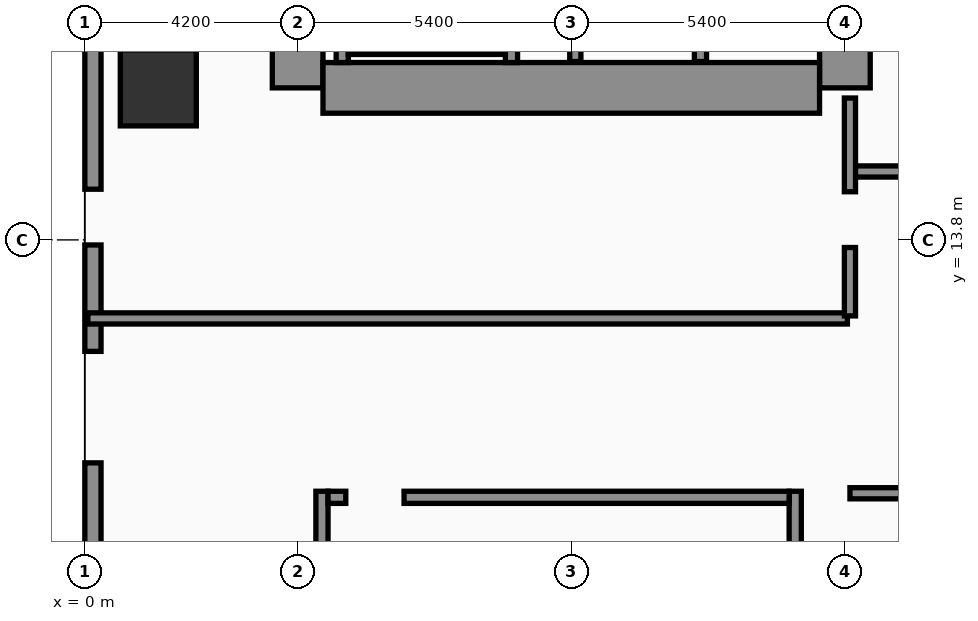
"""IFC4 building model, lengths in metres.
Left out: names, types, materials, properties, quantities, classifications, styles, units other than length and angle.
Written with IfcOpenShell. Run it as: python <this file> out.ifc"""

import sys

from ifc_helpers import new_model, si_unit, direction, frame, frame_2d, origin, origin_2d, place, context, subcontext, project, spatial, rectangle, extrude, element, fill, save


model = new_model("IFC4")
c1 = context("Model", 3, precision=1e-05, world=origin(), true_north=direction((0.0, 1.0)))
c2 = subcontext(c1, "Body", "Model", "MODEL_VIEW")
j1 = project(units=[si_unit("LENGTHUNIT", "METRE"), si_unit("PLANEANGLEUNIT", "RADIAN")], contexts=[c1])
p1 = place(None, origin())
s1 = spatial("IfcSite", under=j1, at=p1, CompositionType="ELEMENT")
p2 = place(p1, origin())
s2 = spatial("IfcBuilding", under=s1, at=p2, CompositionType="ELEMENT")
p3 = place(p2, origin())
s3 = spatial("IfcBuildingStorey", under=s2, at=p3, CompositionType="ELEMENT", Elevation=0.0)
p4 = place(p3, frame((4.2, 16.8, 0.0), z_axis=(0.0, 0.0, 1.0), x_axis=(0.0, 1.0, 0.0)))
e1 = element("IfcWall", 1, at=p4, inside=s3, PredefinedType="SHEAR", context=c2, shape_type="SweptSolid", body=[
    extrude(rectangle(XDim=21.6, YDim=1.0, at=frame_2d((10.8, 0.0))), origin(), (0.0, 0.0, 1.0), 5.68),
])
p5 = place(p3, frame((15.0, 16.8, 0.0), z_axis=(0.0, 0.0, 1.0), x_axis=(0.0, 1.0, 0.0)))
e2 = element("IfcWall", 2, at=p5, inside=s3, PredefinedType="SHEAR", context=c2, shape_type="SweptSolid", body=[
    extrude(rectangle(XDim=21.6, YDim=1.0, at=frame_2d((10.8, 0.0))), origin(), (0.0, 0.0, 1.0), 5.68),
])
p6 = place(p5, frame((8.65, 0.0, 0.0)))
e3 = element("IfcOpeningElement", 3, at=p6, cuts=e2, PredefinedType="OPENING", context=c2, shape_type="SweptSolid", body=[
    extrude(rectangle(XDim=1.1, YDim=2.2, at=frame_2d((0.55, 1.1))), frame((0.0, 0.51, 0.0), z_axis=(0.0, -1.0, 0.0), x_axis=(1.0, 0.0, 0.0)), (0.0, 0.0, 1.0), 1.02),
])
p7 = place(p5, frame((1.25, 0.0, 0.0)))
e4 = element("IfcOpeningElement", 4, at=p7, cuts=e2, PredefinedType="OPENING", context=c2, shape_type="SweptSolid", body=[
    extrude(rectangle(XDim=1.1, YDim=2.2, at=frame_2d((0.55, 1.1))), frame((0.0, 0.51, 0.0), z_axis=(0.0, -1.0, 0.0), x_axis=(1.0, 0.0, 0.0)), (0.0, 0.0, 1.0), 1.02),
])
p8 = place(p5, frame((3.8, 0.0, 0.0)))
e5 = element("IfcOpeningElement", 5, at=p8, cuts=e2, PredefinedType="OPENING", context=c2, shape_type="SweptSolid", body=[
    extrude(rectangle(XDim=1.1, YDim=2.2, at=frame_2d((0.55, 1.1))), frame((0.0, 0.51, 0.0), z_axis=(0.0, -1.0, 0.0), x_axis=(1.0, 0.0, 0.0)), (0.0, 0.0, 1.0), 1.02),
])
p9 = place(p5, frame((6.35, 0.0, 0.0)))
e6 = element("IfcOpeningElement", 6, at=p9, cuts=e2, PredefinedType="OPENING", context=c2, shape_type="SweptSolid", body=[
    extrude(rectangle(XDim=1.1, YDim=2.2, at=frame_2d((0.55, 1.1))), frame((0.0, 0.51, 0.0), z_axis=(0.0, -1.0, 0.0), x_axis=(1.0, 0.0, 0.0)), (0.0, 0.0, 1.0), 1.02),
])
p10 = place(p5, frame((10.85, 0.0, 0.0)))
e7 = element("IfcOpeningElement", 7, at=p10, cuts=e2, PredefinedType="OPENING", context=c2, shape_type="SweptSolid", body=[
    extrude(rectangle(XDim=1.1, YDim=2.2, at=frame_2d((0.55, 1.1))), frame((0.0, 0.51, 0.0), z_axis=(0.0, -1.0, 0.0), x_axis=(1.0, 0.0, 0.0)), (0.0, 0.0, 1.0), 1.02),
])
p11 = place(p5, frame((13.5, 0.0, 0.0)))
e8 = element("IfcOpeningElement", 8, at=p11, cuts=e2, PredefinedType="OPENING", context=c2, shape_type="SweptSolid", body=[
    extrude(rectangle(XDim=1.1, YDim=2.2, at=frame_2d((0.55, 1.1))), frame((0.0, 0.51, 0.0), z_axis=(0.0, -1.0, 0.0), x_axis=(1.0, 0.0, 0.0)), (0.0, 0.0, 1.0), 1.02),
])
p12 = place(p5, frame((16.15, 0.0, 0.0)))
e9 = element("IfcOpeningElement", 9, at=p12, cuts=e2, PredefinedType="OPENING", context=c2, shape_type="SweptSolid", body=[
    extrude(rectangle(XDim=1.1, YDim=2.2, at=frame_2d((0.55, 1.1))), frame((0.0, 0.51, 0.0), z_axis=(0.0, -1.0, 0.0), x_axis=(1.0, 0.0, 0.0)), (0.0, 0.0, 1.0), 1.02),
])
p13 = place(p5, frame((18.9, 0.0, 0.0)))
e10 = element("IfcOpeningElement", 10, at=p13, cuts=e2, PredefinedType="OPENING", context=c2, shape_type="SweptSolid", body=[
    extrude(rectangle(XDim=1.1, YDim=2.2, at=frame_2d((0.55, 1.1))), frame((0.0, 0.51, 0.0), z_axis=(0.0, -1.0, 0.0), x_axis=(1.0, 0.0, 0.0)), (0.0, 0.0, 1.0), 1.02),
])
p14 = place(p3, frame((4.7, 16.8, 0.0), z_axis=(0.0, 0.0, 1.0), x_axis=(1.0, 0.0, 0.0)))
e11 = element("IfcWall", 11, at=p14, inside=s3, PredefinedType="SHEAR", context=c2, shape_type="SweptSolid", body=[
    extrude(rectangle(XDim=9.8, YDim=1.0, at=frame_2d((4.9, 0.0))), origin(), (0.0, 0.0, 1.0), 5.68),
])
p15 = place(p3, frame((5.08, 17.3, 0.0), z_axis=(0.0, 0.0, 1.0), x_axis=(0.0, 1.0, 0.0)))
e12 = element("IfcWall", 12, at=p15, inside=s3, PredefinedType="SOLIDWALL", context=c2, shape_type="SweptSolid", body=[
    extrude(rectangle(XDim=9.49, YDim=0.24, at=frame_2d((4.745, 0.0))), origin(), (0.0, 0.0, 1.0), 5.68),
])
p16 = place(p3, frame((8.42, 17.3, 0.0), z_axis=(0.0, 0.0, 1.0), x_axis=(0.0, 1.0, 0.0)))
e13 = element("IfcWall", 13, at=p16, inside=s3, PredefinedType="SOLIDWALL", context=c2, shape_type="SweptSolid", body=[
    extrude(rectangle(XDim=9.49, YDim=0.24, at=frame_2d((4.745, 0.0))), origin(), (0.0, 0.0, 1.0), 5.68),
])
p17 = place(p16, frame((0.35, 0.0, 0.0)))
e14 = element("IfcOpeningElement", 14, at=p17, cuts=e13, PredefinedType="OPENING", context=c2, shape_type="SweptSolid", body=[
    extrude(rectangle(XDim=1.15, YDim=2.2, at=frame_2d((0.575, 1.1))), frame((0.0, 0.13, 0.0), z_axis=(0.0, -1.0, 0.0), x_axis=(1.0, 0.0, 0.0)), (0.0, 0.0, 1.0), 0.26),
])
p18 = place(p3, frame((5.2, 17.58, 0.0), z_axis=(0.0, 0.0, 1.0), x_axis=(1.0, 0.0, 0.0)))
e15 = element("IfcWall", 15, at=p18, inside=s3, PredefinedType="SOLIDWALL", context=c2, shape_type="SweptSolid", body=[
    extrude(rectangle(XDim=3.1, YDim=0.24, at=frame_2d((1.55, 0.0))), origin(), (0.0, 0.0, 1.0), 5.68),
])
for number, where, z_axis, x_axis in (
    (16, (4.68, 4.96, 0.0), (0.0, 0.0, 1.0), (0.0, 1.0, 0.0)),
    (17, (14.02, 4.96, 0.0), (0.0, 0.0, 1.0), (0.0, 1.0, 0.0)),
):
    element("IfcWall", number, at=place(p3, frame(where, z_axis=z_axis, x_axis=x_axis)), inside=s3, PredefinedType="SOLIDWALL", context=c2, shape_type="SweptSolid", body=[
        extrude(rectangle(XDim=3.88, YDim=0.24, at=frame_2d((1.94, 0.0))), origin(), (0.0, 0.0, 1.0), 5.68),
    ])
p19 = place(p3, frame((4.8, 8.72, 0.0), z_axis=(0.0, 0.0, 1.0), x_axis=(1.0, 0.0, 0.0)))
e18 = element("IfcWall", 18, at=p19, inside=s3, PredefinedType="SOLIDWALL", context=c2, shape_type="SweptSolid", body=[
    extrude(rectangle(XDim=9.1, YDim=0.24, at=frame_2d((4.55, 0.0))), origin(), (0.0, 0.0, 1.0), 5.68),
])
p20 = place(p19, frame((0.35, 0.0, 0.0)))
e19 = element("IfcOpeningElement", 19, at=p20, cuts=e18, PredefinedType="OPENING", context=c2, shape_type="SweptSolid", body=[
    extrude(rectangle(XDim=1.15, YDim=2.2, at=frame_2d((0.575, 1.1))), frame((0.0, 0.13, 0.0), z_axis=(0.0, -1.0, 0.0), x_axis=(1.0, 0.0, 0.0)), (0.0, 0.0, 1.0), 0.26),
])
p21 = place(p3, frame((1.45, 16.8, 0.0), z_axis=(0.0, 0.0, 1.0), x_axis=(1.0, 0.0, 0.0)))
e20 = element("IfcColumn", 20, at=p21, inside=s3, PredefinedType="COLUMN", context=c2, shape_type="SweptSolid", body=[
    extrude(rectangle(XDim=1.5, YDim=1.5, at=origin_2d()), origin(), (0.0, 0.0, 1.0), 5.68),
])
p22 = place(p3, frame((0.16, 2.3, 0.0), z_axis=(0.0, 0.0, 1.0), x_axis=(0.0, 1.0, 0.0)))
e21 = element("IfcWall", 21, at=p22, inside=s3, PredefinedType="SOLIDWALL", context=c2, shape_type="SweptSolid", body=[
    extrude(rectangle(XDim=53.4, YDim=0.32, at=frame_2d((26.7, 0.0))), origin(), (0.0, 0.0, 1.0), 5.68),
])
p23 = place(p22, frame((7.1, 0.0, 0.0)))
e22 = element("IfcOpeningElement", 22, at=p23, cuts=e21, PredefinedType="OPENING", context=c2, shape_type="SweptSolid", body=[
    extrude(rectangle(XDim=2.2, YDim=2.5, at=frame_2d((1.1, 1.25))), frame((0.0, 0.17, 0.0), z_axis=(0.0, -1.0, 0.0), x_axis=(1.0, 0.0, 0.0)), (0.0, 0.0, 1.0), 0.34),
])
p24 = place(p22, frame((11.4, 0.0, 0.0)))
e23 = element("IfcOpeningElement", 23, at=p24, cuts=e21, PredefinedType="OPENING", context=c2, shape_type="SweptSolid", body=[
    extrude(rectangle(XDim=1.1, YDim=2.2, at=frame_2d((0.55, 1.1))), frame((0.0, 0.17, 0.0), z_axis=(0.0, -1.0, 0.0), x_axis=(1.0, 0.0, 0.0)), (0.0, 0.0, 1.0), 0.34),
])
p25 = place(p3, frame((9.68, 17.32, 0.0), z_axis=(0.0, 0.0, 1.0), x_axis=(0.0, 1.0, 0.0)))
e24 = element("IfcWall", 24, at=p25, inside=s3, PredefinedType="SOLIDWALL", context=c2, shape_type="SweptSolid", body=[
    extrude(rectangle(XDim=12.44, YDim=0.22, at=frame_2d((6.22, 0.0))), origin(), (0.0, 0.0, 1.0), 5.68),
])
p26 = place(p25, frame((8.23, 0.0, 0.0)))
e25 = element("IfcOpeningElement", 25, at=p26, cuts=e24, PredefinedType="OPENING", context=c2, shape_type="SweptSolid", body=[
    extrude(rectangle(XDim=1.1, YDim=2.2, at=frame_2d((0.55, 1.1))), frame((0.0, 0.12, 0.0), z_axis=(0.0, -1.0, 0.0), x_axis=(1.0, 0.0, 0.0)), (0.0, 0.0, 1.0), 0.24),
])
p27 = place(p3, frame((12.15, 17.32, 0.0), z_axis=(0.0, 0.0, 1.0), x_axis=(0.0, 1.0, 0.0)))
e26 = element("IfcWall", 26, at=p27, inside=s3, PredefinedType="SOLIDWALL", context=c2, shape_type="SweptSolid", body=[
    extrude(rectangle(XDim=7.65, YDim=0.24, at=frame_2d((3.825, 0.0))), origin(), (0.0, 0.0, 1.0), 5.68),
])
p28 = place(p3, frame((0.06, 12.25, 0.0), z_axis=(0.0, 0.0, 1.0), x_axis=(1.0, 0.0, 0.0)))
e27 = element("IfcWall", 27, at=p28, inside=s3, PredefinedType="SOLIDWALL", context=c2, shape_type="SweptSolid", body=[
    extrude(rectangle(XDim=14.99, YDim=0.22, at=frame_2d((7.495, 0.0))), origin(), (0.0, 0.0, 1.0), 4.88),
])
p29 = place(p3, frame((15.1, 15.15, 0.0), z_axis=(0.0, 0.0, 1.0), x_axis=(1.0, 0.0, 0.0)))
e28 = element("IfcWall", 28, at=p29, inside=s3, PredefinedType="SOLIDWALL", context=c2, shape_type="SweptSolid", body=[
    extrude(rectangle(XDim=6.4, YDim=0.22, at=frame_2d((3.2, 0.0))), origin(), (0.0, 0.0, 1.0), 4.48),
])
p30 = place(p29, frame((1.8, 0.0, 0.0)))
e29 = element("IfcOpeningElement", 29, at=p30, cuts=e28, PredefinedType="OPENING", context=c2, shape_type="SweptSolid", body=[
    extrude(rectangle(XDim=2.2, YDim=2.5, at=frame_2d((1.1, 1.25))), frame((0.0, 0.12, 0.0), z_axis=(0.0, -1.0, 0.0), x_axis=(1.0, 0.0, 0.0)), (0.0, 0.0, 1.0), 0.24),
])
p31 = place(p3, frame((15.1, 8.8, 0.0), z_axis=(0.0, 0.0, 1.0), x_axis=(1.0, 0.0, 0.0)))
e30 = element("IfcWall", 30, at=p31, inside=s3, PredefinedType="SOLIDWALL", context=c2, shape_type="SweptSolid", body=[
    extrude(rectangle(XDim=6.4, YDim=0.22, at=frame_2d((3.2, 0.0))), origin(), (0.0, 0.0, 1.0), 5.68),
])
p32 = place(p31, frame((1.8, 0.0, 0.0)))
e31 = element("IfcOpeningElement", 31, at=p32, cuts=e30, PredefinedType="OPENING", context=c2, shape_type="SweptSolid", body=[
    extrude(rectangle(XDim=2.2, YDim=2.5, at=frame_2d((1.1, 1.25))), frame((0.0, 0.12, 0.0), z_axis=(0.0, -1.0, 0.0), x_axis=(1.0, 0.0, 0.0)), (0.0, 0.0, 1.0), 0.24),
])
p33 = place(p3, frame((15.1, 12.3, 0.0), z_axis=(0.0, 0.0, 1.0), x_axis=(0.0, 1.0, 0.0)))
e32 = element("IfcWall", 32, at=p33, inside=s3, PredefinedType="SOLIDWALL", context=c2, shape_type="SweptSolid", body=[
    extrude(rectangle(XDim=4.3, YDim=0.22, at=frame_2d((2.15, 0.0))), origin(), (0.0, 0.0, 1.0), 4.48),
])
p34 = place(p33, frame((1.35, 0.0, 0.0)))
e33 = element("IfcOpeningElement", 33, at=p34, cuts=e32, PredefinedType="OPENING", context=c2, shape_type="SweptSolid", body=[
    extrude(rectangle(XDim=1.1, YDim=2.2, at=frame_2d((0.55, 1.1))), frame((0.0, 0.12, 0.0), z_axis=(0.0, -1.0, 0.0), x_axis=(1.0, 0.0, 0.0)), (0.0, 0.0, 1.0), 0.24),
])
p35 = place(p23, origin())
e34 = element("IfcDoor", 34, at=p35, inside=s3, OperationType="DOUBLE_DOOR_SINGLE_SWING", PredefinedType="DOOR", context=c2, shape_type="SweptSolid", body=[
    extrude(rectangle(XDim=2.2, YDim=2.5, at=frame_2d((1.1, 1.25))), frame((0.0, 0.025, 0.0), z_axis=(0.0, -1.0, 0.0), x_axis=(1.0, 0.0, 0.0)), (0.0, 0.0, 1.0), 0.05),
])
fill(e22, e34)
p36 = place(p24, origin())
e35 = element("IfcDoor", 35, at=p36, inside=s3, OperationType="SINGLE_SWING_LEFT", PredefinedType="DOOR", context=c2, shape_type="SweptSolid", body=[
    extrude(rectangle(XDim=1.1, YDim=2.2, at=frame_2d((0.55, 1.1))), frame((0.0, 0.025, 0.0), z_axis=(0.0, -1.0, 0.0), x_axis=(1.0, 0.0, 0.0)), (0.0, 0.0, 1.0), 0.05),
])
fill(e23, e35)
p37 = place(p34, origin())
e36 = element("IfcDoor", 36, at=p37, inside=s3, OperationType="SINGLE_SWING_LEFT", PredefinedType="DOOR", context=c2, shape_type="SweptSolid", body=[
    extrude(rectangle(XDim=1.1, YDim=2.2, at=frame_2d((0.55, 1.1))), frame((0.0, 0.025, 0.0), z_axis=(0.0, -1.0, 0.0), x_axis=(1.0, 0.0, 0.0)), (0.0, 0.0, 1.0), 0.05),
])
fill(e33, e36)
p38 = place(p20, origin())
e37 = element("IfcDoor", 37, at=p38, inside=s3, OperationType="SINGLE_SWING_RIGHT", PredefinedType="DOOR", context=c2, shape_type="SweptSolid", body=[
    extrude(rectangle(XDim=1.15, YDim=2.2, at=frame_2d((0.575, 1.1))), frame((0.0, 0.025, 0.0), z_axis=(0.0, -1.0, 0.0), x_axis=(1.0, 0.0, 0.0)), (0.0, 0.0, 1.0), 0.05),
])
fill(e19, e37)
save(model, sys.argv[1])
